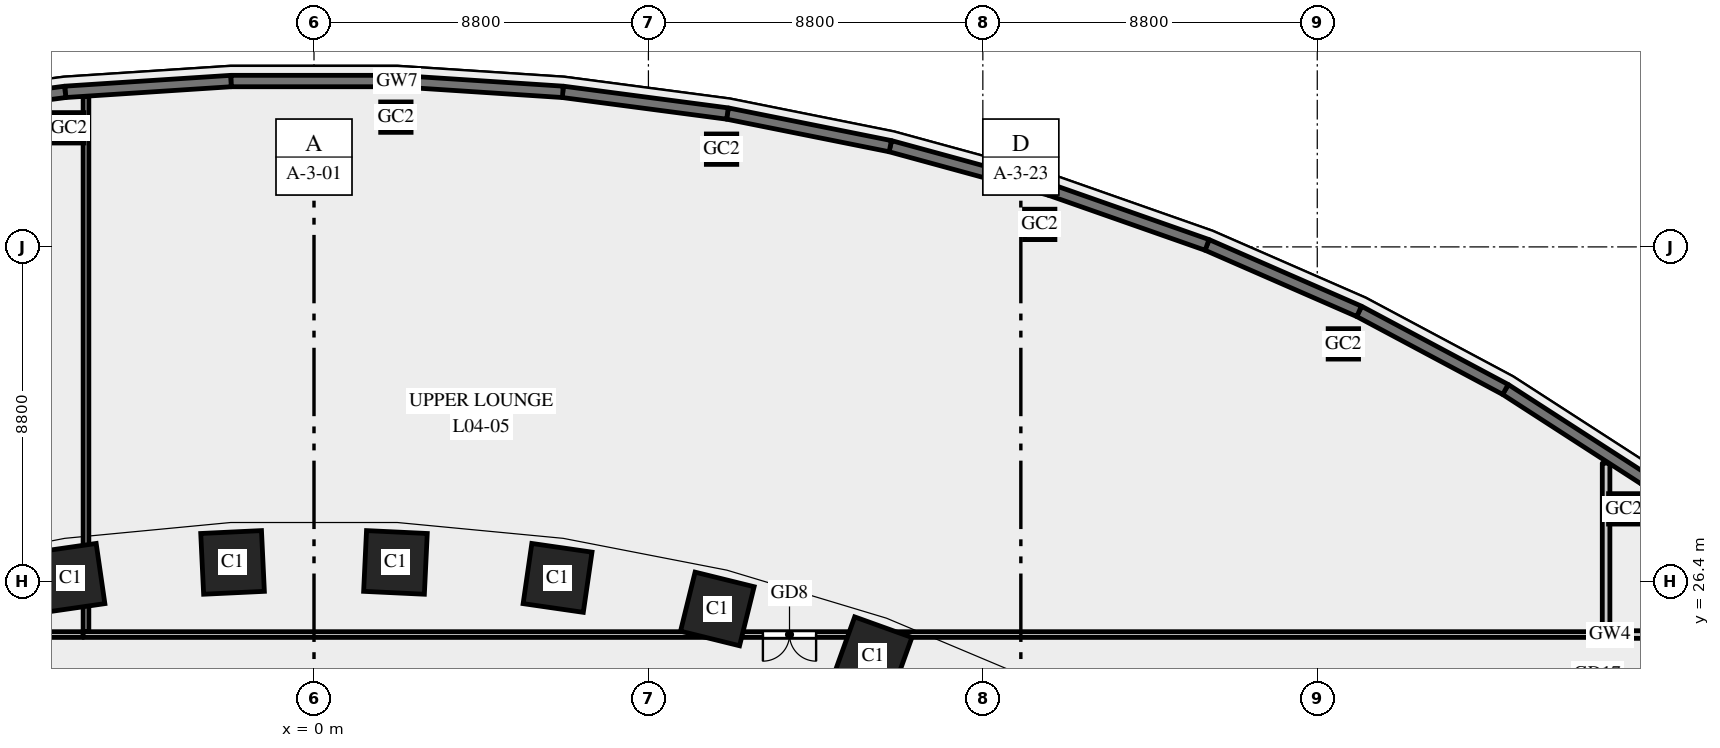
"""IFC4 building model, lengths in metres.
Left out: names, types, materials, properties, quantities, classifications, styles, units other than length and angle.
Written with IfcOpenShell. Run it as: python <this file> out.ifc"""

import sys

from ifc_helpers import new_model, si_unit, direction, frame, frame_2d, origin, origin_2d, place, context, subcontext, project, spatial, rectangle, hollow_rectangle, extrude, element, fill, save


model = new_model("IFC4")
c1 = context("Model", 3, precision=1e-05, world=origin(), true_north=direction((0.0, 1.0)))
c2 = subcontext(c1, "Body", "Model", "MODEL_VIEW")
j1 = project(units=[si_unit("LENGTHUNIT", "METRE"), si_unit("PLANEANGLEUNIT", "RADIAN")], contexts=[c1])
p1 = place(None, origin())
s1 = spatial("IfcSite", under=j1, at=p1, CompositionType="ELEMENT")
p2 = place(p1, origin())
s2 = spatial("IfcBuilding", under=s1, at=p2, CompositionType="ELEMENT")
p3 = place(p2, frame((0.0, 0.0, 25.0)))
s3 = spatial("IfcBuildingStorey", under=s2, at=p3, CompositionType="ELEMENT", Elevation=25.0)
for number, where, z_axis, x_axis in (
    (1, (14.709, 24.441, 0.0), (0.0, 0.0, 1.0), (-0.941, 0.338, 0.0)),
    (2, (10.613, 25.674, 0.0), (0.0, 0.0, 1.0), (-0.971, 0.24, 0.0)),
    (3, (6.409, 26.491, 0.0), (0.0, 0.0, 1.0), (-0.99, 0.143, 0.0)),
    (4, (2.143, 26.898, 0.0), (0.0, 0.0, 1.0), (-0.999, 0.048, 0.0)),
    (5, (-2.143, 26.898, 0.0), (0.0, 0.0, 1.0), (-0.999, -0.048, 0.0)),
    (6, (-6.409, 26.491, 0.0), (0.0, 0.0, 1.0), (-0.99, -0.143, 0.0)),
):
    element("IfcColumn", number, at=place(p3, frame(where, z_axis=z_axis, x_axis=x_axis)), inside=s3, PredefinedType="COLUMN", context=c2, shape_type="SweptSolid", body=[
        extrude(rectangle(XDim=1.6, YDim=1.6, at=origin_2d()), origin(), (0.0, 0.0, 1.0), 5.5),
    ])
for number, where, z_axis, x_axis in (
    (7, (34.465, 28.307, 0.0), (0.0, 0.0, 1.0), (1.0, 0.0, 0.0)),
    (8, (27.087, 32.648, 0.0), (0.0, 0.0, 1.0), (1.0, 0.0, 0.0)),
    (9, (19.097, 35.792, 0.0), (0.0, 0.0, 1.0), (1.0, 0.0, 0.0)),
    (10, (10.725, 37.771, 0.0), (0.0, 0.0, 1.0), (1.0, 0.0, 0.0)),
    (11, (2.155, 38.614, 0.0), (0.0, 0.0, 1.0), (1.0, 0.0, 0.0)),
    (12, (-6.454, 38.333, 0.0), (0.0, 0.0, 1.0), (1.0, 0.0, 0.0)),
):
    element("IfcColumn", number, at=place(p3, frame(where, z_axis=z_axis, x_axis=x_axis)), inside=s3, PredefinedType="COLUMN", context=c2, shape_type="SweptSolid", body=[
        extrude(hollow_rectangle(XDim=0.8, YDim=0.8, WallThickness=0.04, at=origin_2d()), origin(), (0.0, 0.0, 1.0), 5.488),
    ])
p4 = place(p3, frame((-6.0, 39.165, 0.0), z_axis=(0.0, 0.0, 1.0), x_axis=(0.0, -1.0, 0.0)))
e13 = element("IfcWall", 13, at=p4, inside=s3, PredefinedType="PARTITIONING", context=c2, shape_type="SweptSolid", body=[
    extrude(rectangle(XDim=14.09, YDim=0.15, at=frame_2d((7.045, 0.0))), origin(), (0.0, 0.0, 1.0), 4.2),
])
p5 = place(p3, frame((-6.074, 25.0, 0.0), z_axis=(0.0, 0.0, 1.0), x_axis=(-1.0, 0.0, 0.0)))
e14 = element("IfcWall", 14, at=p5, inside=s3, PredefinedType="PARTITIONING", context=c2, shape_type="SweptSolid", body=[
    extrude(rectangle(XDim=28.001, YDim=0.15, at=frame_2d((14.0, 0.0))), origin(), (0.0, 0.0, 1.0), 4.2),
])
p6 = place(p5, frame((13.501, 0.0, 0.0)))
e15 = element("IfcOpeningElement", 15, at=p6, cuts=e14, PredefinedType="OPENING", context=c2, shape_type="SweptSolid", body=[
    extrude(rectangle(XDim=1.0, YDim=2.1, at=frame_2d((0.5, 1.05))), frame((0.0, 0.085, 0.0), z_axis=(0.0, -1.0, 0.0), x_axis=(1.0, 0.0, 0.0)), (0.0, 0.0, 1.0), 0.17),
])
p7 = place(p3, frame((34.0, 29.51, 0.0), z_axis=(0.0, 0.0, 1.0), x_axis=(0.0, -1.0, 0.0)))
e16 = element("IfcWall", 16, at=p7, inside=s3, PredefinedType="PARTITIONING", context=c2, shape_type="SweptSolid", body=[
    extrude(rectangle(XDim=4.435, YDim=0.2, at=frame_2d((2.217, 0.0))), origin(), (0.0, 0.0, 1.0), 4.2),
])
p8 = place(p3, frame((34.1, 25.0, 0.0), z_axis=(0.0, 0.0, 1.0), x_axis=(-1.0, 0.0, 0.0)))
e17 = element("IfcWall", 17, at=p8, inside=s3, PredefinedType="PARTITIONING", context=c2, shape_type="SweptSolid", body=[
    extrude(rectangle(XDim=40.175, YDim=0.15, at=frame_2d((20.087, 0.0))), origin(), (0.0, 0.0, 1.0), 4.2),
])
p9 = place(p8, frame((20.887, 0.0, 0.0)))
e18 = element("IfcOpeningElement", 18, at=p9, cuts=e17, PredefinedType="OPENING", context=c2, shape_type="SweptSolid", body=[
    extrude(rectangle(XDim=1.4, YDim=2.1, at=frame_2d((0.7, 1.05))), frame((0.0, 0.085, 0.0), z_axis=(0.0, -1.0, 0.0), x_axis=(1.0, 0.0, 0.0)), (0.0, 0.0, 1.0), 0.17),
])
p10 = place(p3, frame((36.65, 25.0, 0.0), z_axis=(0.0, 0.0, 1.0), x_axis=(-1.0, 0.0, 0.0)))
e19 = element("IfcWall", 19, at=p10, inside=s3, PredefinedType="PARTITIONING", context=c2, shape_type="SweptSolid", body=[
    extrude(rectangle(XDim=2.55, YDim=0.2, at=frame_2d((1.275, 0.0))), origin(), (0.0, 0.0, 1.0), 5.2),
])
p11 = place(p3, frame((35.016, 29.082, 0.0), z_axis=(0.0, 0.0, 1.0), x_axis=(-0.840047348843, 0.542513088969, 0.0)))
e20 = element("IfcWall", 20, at=p11, inside=s3, PredefinedType="SOLIDWALL", context=c2, shape_type="SweptSolid", body=[
    extrude(rectangle(XDim=4.362, YDim=0.3, at=frame_2d((2.181, 0.0))), origin(), (0.0, 0.0, 1.0), 5.2),
])
p12 = place(p11, frame((1.291, 0.0, 1.0)))
e21 = element("IfcOpeningElement", 21, at=p12, cuts=e20, PredefinedType="OPENING", context=c2, shape_type="SweptSolid", body=[
    extrude(rectangle(XDim=2.4, YDim=3.0, at=frame_2d((1.2, 1.5))), frame((0.0, 0.16, 0.0), z_axis=(0.0, -1.0, 0.0), x_axis=(1.0, 0.0, 0.0)), (0.0, 0.0, 1.0), 0.32),
])
p13 = place(p3, frame((31.352, 31.448, 0.0), z_axis=(0.0, 0.0, 1.0), x_axis=(-0.882159305704, 0.47095112205, 0.0)))
e22 = element("IfcWall", 22, at=p13, inside=s3, PredefinedType="SOLIDWALL", context=c2, shape_type="SweptSolid", body=[
    extrude(rectangle(XDim=4.365, YDim=0.3, at=frame_2d((2.182, 0.0))), origin(), (0.0, 0.0, 1.0), 5.2),
])
p14 = place(p13, frame((0.982, 0.0, 1.0)))
e23 = element("IfcOpeningElement", 23, at=p14, cuts=e22, PredefinedType="OPENING", context=c2, shape_type="SweptSolid", body=[
    extrude(rectangle(XDim=2.4, YDim=3.0, at=frame_2d((1.2, 1.5))), frame((0.0, 0.16, 0.0), z_axis=(0.0, -1.0, 0.0), x_axis=(1.0, 0.0, 0.0)), (0.0, 0.0, 1.0), 0.32),
])
p15 = place(p3, frame((27.501, 33.504, 0.0), z_axis=(0.0, 0.0, 1.0), x_axis=(-0.916336904548, 0.400408138483, 0.0)))
e24 = element("IfcWall", 24, at=p15, inside=s3, PredefinedType="SOLIDWALL", context=c2, shape_type="SweptSolid", body=[
    extrude(rectangle(XDim=4.366, YDim=0.3, at=frame_2d((2.183, 0.0))), origin(), (0.0, 0.0, 1.0), 5.2),
])
p16 = place(p15, frame((0.983, 0.0, 1.0)))
e25 = element("IfcOpeningElement", 25, at=p16, cuts=e24, PredefinedType="OPENING", context=c2, shape_type="SweptSolid", body=[
    extrude(rectangle(XDim=2.4, YDim=3.0, at=frame_2d((1.2, 1.5))), frame((0.0, 0.16, 0.0), z_axis=(0.0, -1.0, 0.0), x_axis=(1.0, 0.0, 0.0)), (0.0, 0.0, 1.0), 0.32),
])
p17 = place(p3, frame((23.5, 35.252, 0.0), z_axis=(0.0, 0.0, 1.0), x_axis=(-0.943526738033, 0.331296384853, 0.0)))
e26 = element("IfcWall", 26, at=p17, inside=s3, PredefinedType="SOLIDWALL", context=c2, shape_type="SweptSolid", body=[
    extrude(rectangle(XDim=4.368, YDim=0.3, at=frame_2d((2.184, 0.0))), origin(), (0.0, 0.0, 1.0), 5.2),
])
p18 = place(p17, frame((0.984, 0.0, 1.0)))
e27 = element("IfcOpeningElement", 27, at=p18, cuts=e26, PredefinedType="OPENING", context=c2, shape_type="SweptSolid", body=[
    extrude(rectangle(XDim=2.4, YDim=3.0, at=frame_2d((1.2, 1.5))), frame((0.0, 0.16, 0.0), z_axis=(0.0, -1.0, 0.0), x_axis=(1.0, 0.0, 0.0)), (0.0, 0.0, 1.0), 0.32),
])
p19 = place(p3, frame((19.379, 36.699, 0.0), z_axis=(0.0, 0.0, 1.0), x_axis=(-0.964679950239, 0.263424739931, 0.0)))
e28 = element("IfcWall", 28, at=p19, inside=s3, PredefinedType="SOLIDWALL", context=c2, shape_type="SweptSolid", body=[
    extrude(rectangle(XDim=4.369, YDim=0.3, at=frame_2d((2.185, 0.0))), origin(), (0.0, 0.0, 1.0), 5.2),
])
p20 = place(p19, frame((0.985, 0.0, 1.0)))
e29 = element("IfcOpeningElement", 29, at=p20, cuts=e28, PredefinedType="OPENING", context=c2, shape_type="SweptSolid", body=[
    extrude(rectangle(XDim=2.4, YDim=3.0, at=frame_2d((1.2, 1.5))), frame((0.0, 0.16, 0.0), z_axis=(0.0, -1.0, 0.0), x_axis=(1.0, 0.0, 0.0)), (0.0, 0.0, 1.0), 0.32),
])
p21 = place(p3, frame((15.165, 37.85, 0.0), z_axis=(0.0, 0.0, 1.0), x_axis=(-0.980494629762, 0.196545875071, 0.0)))
e30 = element("IfcWall", 30, at=p21, inside=s3, PredefinedType="SOLIDWALL", context=c2, shape_type="SweptSolid", body=[
    extrude(rectangle(XDim=4.37, YDim=0.3, at=frame_2d((2.185, 0.0))), origin(), (0.0, 0.0, 1.0), 5.2),
])
p22 = place(p21, frame((0.985, 0.0, 1.0)))
e31 = element("IfcOpeningElement", 31, at=p22, cuts=e30, PredefinedType="OPENING", context=c2, shape_type="SweptSolid", body=[
    extrude(rectangle(XDim=2.4, YDim=3.0, at=frame_2d((1.2, 1.5))), frame((0.0, 0.16, 0.0), z_axis=(0.0, -1.0, 0.0), x_axis=(1.0, 0.0, 0.0)), (0.0, 0.0, 1.0), 0.32),
])
p23 = place(p3, frame((10.88, 38.709, 0.0), z_axis=(0.0, 0.0, 1.0), x_axis=(-0.991441741932, 0.130549884544, 0.0)))
e32 = element("IfcWall", 32, at=p23, inside=s3, PredefinedType="SOLIDWALL", context=c2, shape_type="SweptSolid", body=[
    extrude(rectangle(XDim=4.37, YDim=0.3, at=frame_2d((2.185, 0.0))), origin(), (0.0, 0.0, 1.0), 5.2),
])
p24 = place(p23, frame((0.985, 0.0, 1.0)))
e33 = element("IfcOpeningElement", 33, at=p24, cuts=e32, PredefinedType="OPENING", context=c2, shape_type="SweptSolid", body=[
    extrude(rectangle(XDim=2.4, YDim=3.0, at=frame_2d((1.2, 1.5))), frame((0.0, 0.16, 0.0), z_axis=(0.0, -1.0, 0.0), x_axis=(1.0, 0.0, 0.0)), (0.0, 0.0, 1.0), 0.32),
])
p25 = place(p3, frame((6.547, 39.28, 0.0), z_axis=(0.0, 0.0, 1.0), x_axis=(-0.997876871627, 0.065128711577, 0.0)))
e34 = element("IfcWall", 34, at=p25, inside=s3, PredefinedType="SOLIDWALL", context=c2, shape_type="SweptSolid", body=[
    extrude(rectangle(XDim=4.371, YDim=0.3, at=frame_2d((2.186, 0.0))), origin(), (0.0, 0.0, 1.0), 5.2),
])
p26 = place(p25, frame((0.985, 0.0, 1.0)))
e35 = element("IfcOpeningElement", 35, at=p26, cuts=e34, PredefinedType="OPENING", context=c2, shape_type="SweptSolid", body=[
    extrude(rectangle(XDim=2.4, YDim=3.0, at=frame_2d((1.2, 1.5))), frame((0.0, 0.16, 0.0), z_axis=(0.0, -1.0, 0.0), x_axis=(1.0, 0.0, 0.0)), (0.0, 0.0, 1.0), 0.32),
])
p27 = place(p3, frame((2.186, 39.564, 0.0), z_axis=(0.0, 0.0, 1.0), x_axis=(-1.0, 0.0, 0.0)))
e36 = element("IfcWall", 36, at=p27, inside=s3, PredefinedType="SOLIDWALL", context=c2, shape_type="SweptSolid", body=[
    extrude(rectangle(XDim=4.371, YDim=0.3, at=frame_2d((2.186, 0.0))), origin(), (0.0, 0.0, 1.0), 5.2),
])
p28 = place(p27, frame((0.986, 0.0, 1.0)))
e37 = element("IfcOpeningElement", 37, at=p28, cuts=e36, PredefinedType="OPENING", context=c2, shape_type="SweptSolid", body=[
    extrude(rectangle(XDim=2.4, YDim=3.0, at=frame_2d((1.2, 1.5))), frame((0.0, 0.16, 0.0), z_axis=(0.0, -1.0, 0.0), x_axis=(1.0, 0.0, 0.0)), (0.0, 0.0, 1.0), 0.32),
])
p29 = place(p3, frame((-2.186, 39.564, 0.0), z_axis=(0.0, 0.0, 1.0), x_axis=(-0.997876871627, -0.065128711577, 0.0)))
e38 = element("IfcWall", 38, at=p29, inside=s3, PredefinedType="SOLIDWALL", context=c2, shape_type="SweptSolid", body=[
    extrude(rectangle(XDim=4.371, YDim=0.3, at=frame_2d((2.186, 0.0))), origin(), (0.0, 0.0, 1.0), 5.2),
])
p30 = place(p29, frame((0.985, 0.0, 1.0)))
e39 = element("IfcOpeningElement", 39, at=p30, cuts=e38, PredefinedType="OPENING", context=c2, shape_type="SweptSolid", body=[
    extrude(rectangle(XDim=2.4, YDim=3.0, at=frame_2d((1.2, 1.5))), frame((0.0, 0.16, 0.0), z_axis=(0.0, -1.0, 0.0), x_axis=(1.0, 0.0, 0.0)), (0.0, 0.0, 1.0), 0.32),
])
p31 = place(p3, frame((-6.547, 39.28, 0.0), z_axis=(0.0, 0.0, 1.0), x_axis=(-0.991441741932, -0.130549884544, 0.0)))
e40 = element("IfcWall", 40, at=p31, inside=s3, PredefinedType="SOLIDWALL", context=c2, shape_type="SweptSolid", body=[
    extrude(rectangle(XDim=4.37, YDim=0.3, at=frame_2d((2.185, 0.0))), origin(), (0.0, 0.0, 1.0), 5.2),
])
p32 = place(p31, frame((0.985, 0.0, 1.0)))
e41 = element("IfcOpeningElement", 41, at=p32, cuts=e40, PredefinedType="OPENING", context=c2, shape_type="SweptSolid", body=[
    extrude(rectangle(XDim=2.4, YDim=3.0, at=frame_2d((1.2, 1.5))), frame((0.0, 0.16, 0.0), z_axis=(0.0, -1.0, 0.0), x_axis=(1.0, 0.0, 0.0)), (0.0, 0.0, 1.0), 0.32),
])
p33 = place(p9, origin())
e42 = element("IfcDoor", 42, at=p33, inside=s3, OperationType="DOUBLE_DOOR_SINGLE_SWING", PredefinedType="DOOR", context=c2, shape_type="SweptSolid", body=[
    extrude(rectangle(XDim=1.4, YDim=2.1, at=frame_2d((0.7, 1.05))), frame((0.0, 0.025, 0.0), z_axis=(0.0, -1.0, 0.0), x_axis=(1.0, 0.0, 0.0)), (0.0, 0.0, 1.0), 0.05),
])
fill(e18, e42)
p34 = place(p12, origin())
e43 = element("IfcWindow", 43, at=p34, inside=s3, PartitioningType="SINGLE_PANEL", PredefinedType="WINDOW", context=c2, shape_type="SweptSolid", body=[
    extrude(rectangle(XDim=2.4, YDim=3.0, at=frame_2d((1.2, 1.5))), frame((0.0, 0.03, 0.0), z_axis=(0.0, -1.0, 0.0), x_axis=(1.0, 0.0, 0.0)), (0.0, 0.0, 1.0), 0.06),
])
fill(e21, e43)
p35 = place(p14, origin())
e44 = element("IfcWindow", 44, at=p35, inside=s3, PartitioningType="SINGLE_PANEL", PredefinedType="WINDOW", context=c2, shape_type="SweptSolid", body=[
    extrude(rectangle(XDim=2.4, YDim=3.0, at=frame_2d((1.2, 1.5))), frame((0.0, 0.03, 0.0), z_axis=(0.0, -1.0, 0.0), x_axis=(1.0, 0.0, 0.0)), (0.0, 0.0, 1.0), 0.06),
])
fill(e23, e44)
p36 = place(p16, origin())
e45 = element("IfcWindow", 45, at=p36, inside=s3, PartitioningType="SINGLE_PANEL", PredefinedType="WINDOW", context=c2, shape_type="SweptSolid", body=[
    extrude(rectangle(XDim=2.4, YDim=3.0, at=frame_2d((1.2, 1.5))), frame((0.0, 0.03, 0.0), z_axis=(0.0, -1.0, 0.0), x_axis=(1.0, 0.0, 0.0)), (0.0, 0.0, 1.0), 0.06),
])
fill(e25, e45)
p37 = place(p18, origin())
e46 = element("IfcWindow", 46, at=p37, inside=s3, PartitioningType="SINGLE_PANEL", PredefinedType="WINDOW", context=c2, shape_type="SweptSolid", body=[
    extrude(rectangle(XDim=2.4, YDim=3.0, at=frame_2d((1.2, 1.5))), frame((0.0, 0.03, 0.0), z_axis=(0.0, -1.0, 0.0), x_axis=(1.0, 0.0, 0.0)), (0.0, 0.0, 1.0), 0.06),
])
fill(e27, e46)
p38 = place(p20, origin())
e47 = element("IfcWindow", 47, at=p38, inside=s3, PartitioningType="SINGLE_PANEL", PredefinedType="WINDOW", context=c2, shape_type="SweptSolid", body=[
    extrude(rectangle(XDim=2.4, YDim=3.0, at=frame_2d((1.2, 1.5))), frame((0.0, 0.03, 0.0), z_axis=(0.0, -1.0, 0.0), x_axis=(1.0, 0.0, 0.0)), (0.0, 0.0, 1.0), 0.06),
])
fill(e29, e47)
p39 = place(p22, origin())
e48 = element("IfcWindow", 48, at=p39, inside=s3, PartitioningType="SINGLE_PANEL", PredefinedType="WINDOW", context=c2, shape_type="SweptSolid", body=[
    extrude(rectangle(XDim=2.4, YDim=3.0, at=frame_2d((1.2, 1.5))), frame((0.0, 0.03, 0.0), z_axis=(0.0, -1.0, 0.0), x_axis=(1.0, 0.0, 0.0)), (0.0, 0.0, 1.0), 0.06),
])
fill(e31, e48)
p40 = place(p24, origin())
e49 = element("IfcWindow", 49, at=p40, inside=s3, PartitioningType="SINGLE_PANEL", PredefinedType="WINDOW", context=c2, shape_type="SweptSolid", body=[
    extrude(rectangle(XDim=2.4, YDim=3.0, at=frame_2d((1.2, 1.5))), frame((0.0, 0.03, 0.0), z_axis=(0.0, -1.0, 0.0), x_axis=(1.0, 0.0, 0.0)), (0.0, 0.0, 1.0), 0.06),
])
fill(e33, e49)
p41 = place(p26, origin())
e50 = element("IfcWindow", 50, at=p41, inside=s3, PartitioningType="SINGLE_PANEL", PredefinedType="WINDOW", context=c2, shape_type="SweptSolid", body=[
    extrude(rectangle(XDim=2.4, YDim=3.0, at=frame_2d((1.2, 1.5))), frame((0.0, 0.03, 0.0), z_axis=(0.0, -1.0, 0.0), x_axis=(1.0, 0.0, 0.0)), (0.0, 0.0, 1.0), 0.06),
])
fill(e35, e50)
p42 = place(p28, origin())
e51 = element("IfcWindow", 51, at=p42, inside=s3, PartitioningType="SINGLE_PANEL", PredefinedType="WINDOW", context=c2, shape_type="SweptSolid", body=[
    extrude(rectangle(XDim=2.4, YDim=3.0, at=frame_2d((1.2, 1.5))), frame((0.0, 0.03, 0.0), z_axis=(0.0, -1.0, 0.0), x_axis=(1.0, 0.0, 0.0)), (0.0, 0.0, 1.0), 0.06),
])
fill(e37, e51)
p43 = place(p30, origin())
e52 = element("IfcWindow", 52, at=p43, inside=s3, PartitioningType="SINGLE_PANEL", PredefinedType="WINDOW", context=c2, shape_type="SweptSolid", body=[
    extrude(rectangle(XDim=2.4, YDim=3.0, at=frame_2d((1.2, 1.5))), frame((0.0, 0.03, 0.0), z_axis=(0.0, -1.0, 0.0), x_axis=(1.0, 0.0, 0.0)), (0.0, 0.0, 1.0), 0.06),
])
fill(e39, e52)
save(model, sys.argv[1])
